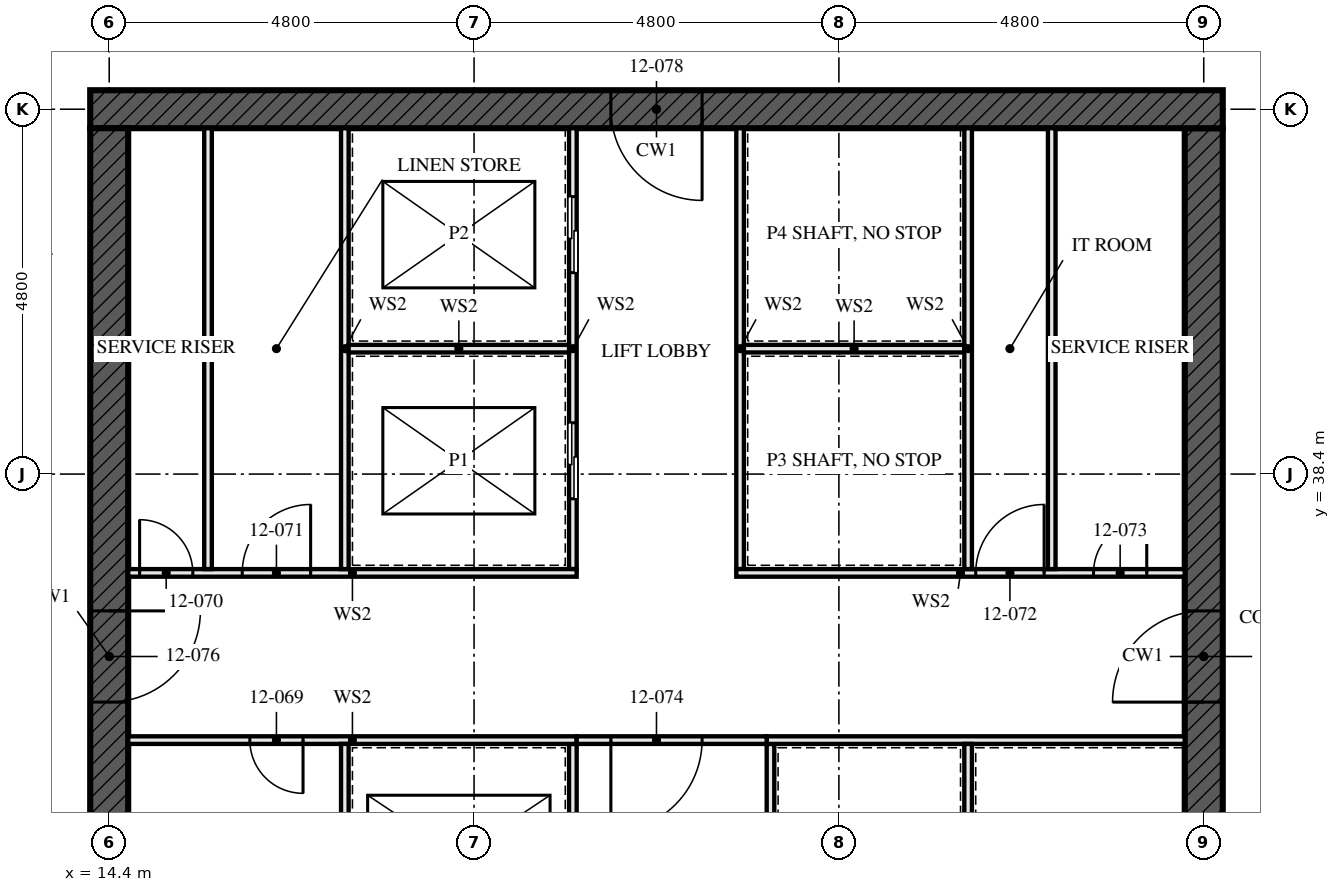
"""IFC4 building model, lengths in metres.
Left out: names, types, materials, properties, quantities, classifications, styles, units other than length and angle.
Written with IfcOpenShell. Run it as: python <this file> out.ifc"""

import sys

from ifc_helpers import new_model, si_unit, direction, frame, frame_2d, origin, place, context, subcontext, project, spatial, rectangle, extrude, element, fill, save


model = new_model("IFC4")
c1 = context("Model", 3, precision=1e-05, world=origin(), true_north=direction((0.0, 1.0)))
c2 = subcontext(c1, "Body", "Model", "MODEL_VIEW")
j1 = project(units=[si_unit("LENGTHUNIT", "METRE"), si_unit("PLANEANGLEUNIT", "RADIAN")], contexts=[c1])
p1 = place(None, origin())
s1 = spatial("IfcSite", under=j1, at=p1, CompositionType="ELEMENT")
p2 = place(p1, origin())
s2 = spatial("IfcBuilding", under=s1, at=p2, CompositionType="ELEMENT")
p3 = place(p2, frame((0.0, 0.0, 48.0)))
s3 = spatial("IfcBuildingStorey", under=s2, at=p3, CompositionType="ELEMENT", Elevation=48.0)
p4 = place(p3, frame((29.05, 43.2, -0.17), z_axis=(0.0, 0.0, 1.0), x_axis=(-1.0, 0.0, 0.0)))
e1 = element("IfcWall", 1, at=p4, inside=s3, PredefinedType="SHEAR", context=c2, shape_type="SweptSolid", body=[
    extrude(rectangle(XDim=14.9, YDim=0.5, at=frame_2d((7.45, 0.0))), origin(), (0.0, 0.0, 1.0), 3.5),
])
p5 = place(p4, frame((6.85, 0.0, 0.17)))
e2 = element("IfcOpeningElement", 2, at=p5, cuts=e1, PredefinedType="OPENING", context=c2, shape_type="SweptSolid", body=[
    extrude(rectangle(XDim=1.2, YDim=2.1, at=frame_2d((0.6, 1.05))), frame((0.0, 0.26, 0.0), z_axis=(0.0, -1.0, 0.0), x_axis=(1.0, 0.0, 0.0)), (0.0, 0.0, 1.0), 0.521),
])
p6 = place(p3, frame((14.4, 42.95, -0.17), z_axis=(0.0, 0.0, 1.0), x_axis=(0.0, -1.0, 0.0)))
e3 = element("IfcWall", 3, at=p6, inside=s3, PredefinedType="SHEAR", context=c2, shape_type="SweptSolid", body=[
    extrude(rectangle(XDim=13.9, YDim=0.5, at=frame_2d((6.95, 0.0))), origin(), (0.0, 0.0, 1.0), 3.5),
])
p7 = place(p6, frame((6.35, 0.0, 0.17)))
e4 = element("IfcOpeningElement", 4, at=p7, cuts=e3, PredefinedType="OPENING", context=c2, shape_type="SweptSolid", body=[
    extrude(rectangle(XDim=1.2, YDim=2.1, at=frame_2d((0.6, 1.05))), frame((0.0, 0.26, 0.0), z_axis=(0.0, -1.0, 0.0), x_axis=(1.0, 0.0, 0.0)), (0.0, 0.0, 1.0), 0.521),
])
p8 = place(p3, frame((28.8, 29.05, -0.17), z_axis=(0.0, 0.0, 1.0), x_axis=(0.0, 1.0, 0.0)))
e5 = element("IfcWall", 5, at=p8, inside=s3, PredefinedType="SHEAR", context=c2, shape_type="SweptSolid", body=[
    extrude(rectangle(XDim=13.9, YDim=0.5, at=frame_2d((6.95, 0.0))), origin(), (0.0, 0.0, 1.0), 3.5),
])
p9 = place(p8, frame((6.35, 0.0, 0.17)))
e6 = element("IfcOpeningElement", 6, at=p9, cuts=e5, PredefinedType="OPENING", context=c2, shape_type="SweptSolid", body=[
    extrude(rectangle(XDim=1.2, YDim=2.1, at=frame_2d((0.6, 1.05))), frame((0.0, 0.26, 0.0), z_axis=(0.0, -1.0, 0.0), x_axis=(1.0, 0.0, 0.0)), (0.0, 0.0, 1.0), 0.521),
])
for number, where, z_axis, x_axis in (
    (7, (15.7, 37.15, 0.0), (0.0, 0.0, 1.0), (0.0, 1.0, 0.0)),
    (8, (26.8, 37.15, 0.0), (0.0, 0.0, 1.0), (0.0, 1.0, 0.0)),
):
    element("IfcWall", number, at=place(p3, frame(where, z_axis=z_axis, x_axis=x_axis)), inside=s3, PredefinedType="SOLIDWALL", context=c2, shape_type="SweptSolid", body=[
        extrude(rectangle(XDim=5.8, YDim=0.1, at=frame_2d((2.9, 0.0))), origin(), (0.0, 0.0, 1.0), 3.33),
    ])
p10 = place(p3, frame((20.5, 29.05, 0.0), z_axis=(0.0, 0.0, 1.0), x_axis=(0.0, 1.0, 0.0)))
e9 = element("IfcWall", 9, at=p10, inside=s3, PredefinedType="SOLIDWALL", context=c2, shape_type="SweptSolid", body=[
    extrude(rectangle(XDim=5.8, YDim=0.1, at=frame_2d((2.9, 0.0))), origin(), (0.0, 0.0, 1.0), 3.33),
])
p11 = place(p10, frame((0.8, 0.0, 0.0)))
e10 = element("IfcOpeningElement", 10, at=p11, cuts=e9, PredefinedType="OPENING", context=c2, shape_type="SweptSolid", body=[
    extrude(rectangle(XDim=1.1, YDim=2.3, at=frame_2d((0.55, 1.15))), frame((0.0, 0.061, 0.0), z_axis=(0.0, -1.0, 0.0), x_axis=(1.0, 0.0, 0.0)), (0.0, 0.0, 1.0), 0.121),
])
p12 = place(p10, frame((3.775, 0.0, 0.0)))
e11 = element("IfcOpeningElement", 11, at=p12, cuts=e9, PredefinedType="OPENING", context=c2, shape_type="SweptSolid", body=[
    extrude(rectangle(XDim=1.1, YDim=2.3, at=frame_2d((0.55, 1.15))), frame((0.0, 0.061, 0.0), z_axis=(0.0, -1.0, 0.0), x_axis=(1.0, 0.0, 0.0)), (0.0, 0.0, 1.0), 0.121),
])
p13 = place(p3, frame((20.5, 37.15, 0.0), z_axis=(0.0, 0.0, 1.0), x_axis=(0.0, 1.0, 0.0)))
e12 = element("IfcWall", 12, at=p13, inside=s3, PredefinedType="SOLIDWALL", context=c2, shape_type="SweptSolid", body=[
    extrude(rectangle(XDim=5.8, YDim=0.1, at=frame_2d((2.9, 0.0))), origin(), (0.0, 0.0, 1.0), 3.33),
])
p14 = place(p13, frame((0.925, 0.0, 0.0)))
e13 = element("IfcOpeningElement", 13, at=p14, cuts=e12, PredefinedType="OPENING", context=c2, shape_type="SweptSolid", body=[
    extrude(rectangle(XDim=1.0, YDim=2.1, at=frame_2d((0.5, 1.05))), frame((0.0, 0.061, 0.0), z_axis=(0.0, -1.0, 0.0), x_axis=(1.0, 0.0, 0.0)), (0.0, 0.0, 1.0), 0.121),
])
p15 = place(p13, frame((3.9, 0.0, 0.0)))
e14 = element("IfcOpeningElement", 14, at=p15, cuts=e12, PredefinedType="OPENING", context=c2, shape_type="SweptSolid", body=[
    extrude(rectangle(XDim=1.0, YDim=2.1, at=frame_2d((0.5, 1.05))), frame((0.0, 0.061, 0.0), z_axis=(0.0, -1.0, 0.0), x_axis=(1.0, 0.0, 0.0)), (0.0, 0.0, 1.0), 0.121),
])
p16 = place(p3, frame((22.7, 37.15, 0.0), z_axis=(0.0, 0.0, 1.0), x_axis=(0.0, 1.0, 0.0)))
e15 = element("IfcWall", 15, at=p16, inside=s3, PredefinedType="SOLIDWALL", context=c2, shape_type="SweptSolid", body=[
    extrude(rectangle(XDim=5.8, YDim=0.1, at=frame_2d((2.9, 0.0))), origin(), (0.0, 0.0, 1.0), 3.33),
])
p17 = place(p3, frame((23.1, 29.05, 0.0), z_axis=(0.0, 0.0, 1.0), x_axis=(0.0, 1.0, 0.0)))
e16 = element("IfcWall", 16, at=p17, inside=s3, PredefinedType="SOLIDWALL", context=c2, shape_type="SweptSolid", body=[
    extrude(rectangle(XDim=5.8, YDim=0.1, at=frame_2d((2.9, 0.0))), origin(), (0.0, 0.0, 1.0), 3.33),
])
p18 = place(p17, frame((1.0, 0.0, 0.0)))
e17 = element("IfcOpeningElement", 17, at=p18, cuts=e16, PredefinedType="OPENING", context=c2, shape_type="SweptSolid", body=[
    extrude(rectangle(XDim=0.7, YDim=2.1, at=frame_2d((0.35, 1.05))), frame((0.0, 0.061, 0.0), z_axis=(0.0, -1.0, 0.0), x_axis=(1.0, 0.0, 0.0)), (0.0, 0.0, 1.0), 0.121),
])
p19 = place(p3, frame((14.65, 34.9, 0.0), z_axis=(0.0, 0.0, 1.0), x_axis=(1.0, 0.0, 0.0)))
e18 = element("IfcWall", 18, at=p19, inside=s3, PredefinedType="SOLIDWALL", context=c2, shape_type="SweptSolid", body=[
    extrude(rectangle(XDim=5.9, YDim=0.1, at=frame_2d((2.95, 0.0))), origin(), (0.0, 0.0, 1.0), 3.33),
])
p20 = place(p19, frame((1.6, 0.0, 0.0)))
e19 = element("IfcOpeningElement", 19, at=p20, cuts=e18, PredefinedType="OPENING", context=c2, shape_type="SweptSolid", body=[
    extrude(rectangle(XDim=0.7, YDim=2.1, at=frame_2d((0.35, 1.05))), frame((0.0, 0.061, 0.0), z_axis=(0.0, -1.0, 0.0), x_axis=(1.0, 0.0, 0.0)), (0.0, 0.0, 1.0), 0.121),
])
p21 = place(p3, frame((23.05, 34.9, 0.0), z_axis=(0.0, 0.0, 1.0), x_axis=(1.0, 0.0, 0.0)))
e20 = element("IfcWall", 20, at=p21, inside=s3, PredefinedType="SOLIDWALL", context=c2, shape_type="SweptSolid", body=[
    extrude(rectangle(XDim=5.5, YDim=0.1, at=frame_2d((2.75, 0.0))), origin(), (0.0, 0.0, 1.0), 3.33),
])
p22 = place(p3, frame((14.65, 37.1, 0.0), z_axis=(0.0, 0.0, 1.0), x_axis=(1.0, 0.0, 0.0)))
e21 = element("IfcWall", 21, at=p22, inside=s3, PredefinedType="SOLIDWALL", context=c2, shape_type="SweptSolid", body=[
    extrude(rectangle(XDim=5.9, YDim=0.1, at=frame_2d((2.95, 0.0))), origin(), (0.0, 0.0, 1.0), 3.33),
])
p23 = place(p22, frame((0.15, 0.0, 0.0)))
e22 = element("IfcOpeningElement", 22, at=p23, cuts=e21, PredefinedType="OPENING", context=c2, shape_type="SweptSolid", body=[
    extrude(rectangle(XDim=0.7, YDim=2.1, at=frame_2d((0.35, 1.05))), frame((0.0, 0.061, 0.0), z_axis=(0.0, -1.0, 0.0), x_axis=(1.0, 0.0, 0.0)), (0.0, 0.0, 1.0), 0.121),
])
p24 = place(p22, frame((1.5, 0.0, 0.0)))
e23 = element("IfcOpeningElement", 23, at=p24, cuts=e21, PredefinedType="OPENING", context=c2, shape_type="SweptSolid", body=[
    extrude(rectangle(XDim=0.9, YDim=2.1, at=frame_2d((0.45, 1.05))), frame((0.0, 0.061, 0.0), z_axis=(0.0, -1.0, 0.0), x_axis=(1.0, 0.0, 0.0)), (0.0, 0.0, 1.0), 0.121),
])
p25 = place(p3, frame((22.65, 37.1, 0.0), z_axis=(0.0, 0.0, 1.0), x_axis=(1.0, 0.0, 0.0)))
e24 = element("IfcWall", 24, at=p25, inside=s3, PredefinedType="SOLIDWALL", context=c2, shape_type="SweptSolid", body=[
    extrude(rectangle(XDim=5.9, YDim=0.1, at=frame_2d((2.95, 0.0))), origin(), (0.0, 0.0, 1.0), 3.33),
])
p26 = place(p25, frame((3.15, 0.0, 0.0)))
e25 = element("IfcOpeningElement", 25, at=p26, cuts=e24, PredefinedType="OPENING", context=c2, shape_type="SweptSolid", body=[
    extrude(rectangle(XDim=0.9, YDim=2.1, at=frame_2d((0.45, 1.05))), frame((0.0, 0.061, 0.0), z_axis=(0.0, -1.0, 0.0), x_axis=(1.0, 0.0, 0.0)), (0.0, 0.0, 1.0), 0.121),
])
p27 = place(p25, frame((4.7, 0.0, 0.0)))
e26 = element("IfcOpeningElement", 26, at=p27, cuts=e24, PredefinedType="OPENING", context=c2, shape_type="SweptSolid", body=[
    extrude(rectangle(XDim=0.7, YDim=2.1, at=frame_2d((0.35, 1.05))), frame((0.0, 0.061, 0.0), z_axis=(0.0, -1.0, 0.0), x_axis=(1.0, 0.0, 0.0)), (0.0, 0.0, 1.0), 0.121),
])
p28 = place(p3, frame((20.55, 34.9, 0.0), z_axis=(0.0, 0.0, 1.0), x_axis=(1.0, 0.0, 0.0)))
e27 = element("IfcWall", 27, at=p28, inside=s3, PredefinedType="SOLIDWALL", context=c2, shape_type="SweptSolid", body=[
    extrude(rectangle(XDim=2.5, YDim=0.1, at=frame_2d((1.25, 0.0))), origin(), (0.0, 0.0, 1.0), 3.33),
])
p29 = place(p28, frame((0.45, 0.0, 0.0)))
e28 = element("IfcOpeningElement", 28, at=p29, cuts=e27, PredefinedType="OPENING", context=c2, shape_type="SweptSolid", body=[
    extrude(rectangle(XDim=1.2, YDim=2.1, at=frame_2d((0.6, 1.05))), frame((0.0, 0.061, 0.0), z_axis=(0.0, -1.0, 0.0), x_axis=(1.0, 0.0, 0.0)), (0.0, 0.0, 1.0), 0.121),
])
for number, where, z_axis, x_axis in (
    (29, (17.5, 29.05, 0.0), (0.0, 0.0, 1.0), (0.0, 1.0, 0.0)),
    (30, (17.5, 37.15, 0.0), (0.0, 0.0, 1.0), (0.0, 1.0, 0.0)),
):
    element("IfcWall", number, at=place(p3, frame(where, z_axis=z_axis, x_axis=x_axis)), inside=s3, PredefinedType="SOLIDWALL", context=c2, shape_type="SweptSolid", body=[
        extrude(rectangle(XDim=5.8, YDim=0.1, at=frame_2d((2.9, 0.0))), origin(), (0.0, 0.0, 1.0), 3.33),
    ])
for number, where, z_axis, x_axis in (
    (31, (17.55, 40.05, 0.0), (0.0, 0.0, 1.0), (1.0, 0.0, 0.0)),
    (32, (22.75, 40.05, 0.0), (0.0, 0.0, 1.0), (1.0, 0.0, 0.0)),
):
    element("IfcWall", number, at=place(p3, frame(where, z_axis=z_axis, x_axis=x_axis)), inside=s3, PredefinedType="SOLIDWALL", context=c2, shape_type="SweptSolid", body=[
        extrude(rectangle(XDim=2.9, YDim=0.1, at=frame_2d((1.45, 0.0))), origin(), (0.0, 0.0, 1.0), 3.33),
    ])
p30 = place(p3, frame((25.7, 37.15, 0.0), z_axis=(0.0, 0.0, 1.0), x_axis=(0.0, 1.0, 0.0)))
e33 = element("IfcWall", 33, at=p30, inside=s3, PredefinedType="SOLIDWALL", context=c2, shape_type="SweptSolid", body=[
    extrude(rectangle(XDim=5.8, YDim=0.1, at=frame_2d((2.9, 0.0))), origin(), (0.0, 0.0, 1.0), 3.33),
])
p31 = place(p3, frame((25.7, 31.95, 0.0), z_axis=(0.0, 0.0, 1.0), x_axis=(0.0, 1.0, 0.0)))
e34 = element("IfcWall", 34, at=p31, inside=s3, PredefinedType="SOLIDWALL", context=c2, shape_type="SweptSolid", body=[
    extrude(rectangle(XDim=2.9, YDim=0.1, at=frame_2d((1.45, 0.0))), origin(), (0.0, 0.0, 1.0), 3.33),
])
p32 = place(p14, origin())
e35 = element("IfcDoor", 35, at=p32, inside=s3, OperationType="SLIDING_TO_LEFT", PredefinedType="DOOR", context=c2, shape_type="SweptSolid", body=[
    extrude(rectangle(XDim=1.0, YDim=2.1, at=frame_2d((0.5, 1.05))), frame((0.0, 0.05, 0.0), z_axis=(0.0, -1.0, 0.0), x_axis=(1.0, 0.0, 0.0)), (0.0, 0.0, 1.0), 0.1),
])
fill(e13, e35)
p33 = place(p15, origin())
e36 = element("IfcDoor", 36, at=p33, inside=s3, OperationType="SLIDING_TO_LEFT", PredefinedType="DOOR", context=c2, shape_type="SweptSolid", body=[
    extrude(rectangle(XDim=1.0, YDim=2.1, at=frame_2d((0.5, 1.05))), frame((0.0, 0.05, 0.0), z_axis=(0.0, -1.0, 0.0), x_axis=(1.0, 0.0, 0.0)), (0.0, 0.0, 1.0), 0.1),
])
fill(e14, e36)
p34 = place(p20, frame((0.7, 0.0, 0.0), z_axis=(0.0, 0.0, 1.0), x_axis=(-1.0, 0.0, 0.0)))
e37 = element("IfcDoor", 37, at=p34, inside=s3, OperationType="SINGLE_SWING_RIGHT", PredefinedType="DOOR", context=c2, shape_type="SweptSolid", body=[
    extrude(rectangle(XDim=0.7, YDim=2.1, at=frame_2d((0.35, 1.05))), frame((0.0, 0.027, 0.0), z_axis=(0.0, -1.0, 0.0), x_axis=(1.0, 0.0, 0.0)), (0.0, 0.0, 1.0), 0.054),
])
fill(e19, e37)
p35 = place(p23, origin())
e38 = element("IfcDoor", 38, at=p35, inside=s3, OperationType="SINGLE_SWING_RIGHT", PredefinedType="DOOR", context=c2, shape_type="SweptSolid", body=[
    extrude(rectangle(XDim=0.7, YDim=2.1, at=frame_2d((0.35, 1.05))), frame((0.0, 0.027, 0.0), z_axis=(0.0, -1.0, 0.0), x_axis=(1.0, 0.0, 0.0)), (0.0, 0.0, 1.0), 0.054),
])
fill(e22, e38)
p36 = place(p24, origin())
e39 = element("IfcDoor", 39, at=p36, inside=s3, OperationType="SINGLE_SWING_LEFT", PredefinedType="DOOR", context=c2, shape_type="SweptSolid", body=[
    extrude(rectangle(XDim=0.9, YDim=2.1, at=frame_2d((0.45, 1.05))), frame((0.0, 0.027, 0.0), z_axis=(0.0, -1.0, 0.0), x_axis=(1.0, 0.0, 0.0)), (0.0, 0.0, 1.0), 0.054),
])
fill(e23, e39)
p37 = place(p26, origin())
e40 = element("IfcDoor", 40, at=p37, inside=s3, OperationType="SINGLE_SWING_LEFT", PredefinedType="DOOR", context=c2, shape_type="SweptSolid", body=[
    extrude(rectangle(XDim=0.9, YDim=2.1, at=frame_2d((0.45, 1.05))), frame((0.0, 0.027, 0.0), z_axis=(0.0, -1.0, 0.0), x_axis=(1.0, 0.0, 0.0)), (0.0, 0.0, 1.0), 0.054),
])
fill(e25, e40)
p38 = place(p27, origin())
e41 = element("IfcDoor", 41, at=p38, inside=s3, OperationType="SINGLE_SWING_LEFT", PredefinedType="DOOR", context=c2, shape_type="SweptSolid", body=[
    extrude(rectangle(XDim=0.7, YDim=2.1, at=frame_2d((0.35, 1.05))), frame((0.0, 0.027, 0.0), z_axis=(0.0, -1.0, 0.0), x_axis=(1.0, 0.0, 0.0)), (0.0, 0.0, 1.0), 0.054),
])
fill(e26, e41)
p39 = place(p29, frame((1.2, 0.0, 0.0), z_axis=(0.0, 0.0, 1.0), x_axis=(-1.0, 0.0, 0.0)))
e42 = element("IfcDoor", 42, at=p39, inside=s3, OperationType="SINGLE_SWING_LEFT", PredefinedType="DOOR", context=c2, shape_type="SweptSolid", body=[
    extrude(rectangle(XDim=1.2, YDim=2.1, at=frame_2d((0.6, 1.05))), frame((0.0, 0.027, 0.0), z_axis=(0.0, -1.0, 0.0), x_axis=(1.0, 0.0, 0.0)), (0.0, 0.0, 1.0), 0.054),
])
fill(e28, e42)
p40 = place(p7, origin())
e43 = element("IfcDoor", 43, at=p40, inside=s3, OperationType="SINGLE_SWING_LEFT", PredefinedType="DOOR", context=c2, shape_type="SweptSolid", body=[
    extrude(rectangle(XDim=1.2, YDim=2.1, at=frame_2d((0.6, 1.05))), frame((0.0, 0.027, 0.0), z_axis=(0.0, -1.0, 0.0), x_axis=(1.0, 0.0, 0.0)), (0.0, 0.0, 1.0), 0.054),
])
fill(e4, e43)
p41 = place(p9, origin())
e44 = element("IfcDoor", 44, at=p41, inside=s3, OperationType="SINGLE_SWING_LEFT", PredefinedType="DOOR", context=c2, shape_type="SweptSolid", body=[
    extrude(rectangle(XDim=1.2, YDim=2.1, at=frame_2d((0.6, 1.05))), frame((0.0, 0.027, 0.0), z_axis=(0.0, -1.0, 0.0), x_axis=(1.0, 0.0, 0.0)), (0.0, 0.0, 1.0), 0.054),
])
fill(e6, e44)
p42 = place(p5, origin())
e45 = element("IfcDoor", 45, at=p42, inside=s3, OperationType="SINGLE_SWING_LEFT", PredefinedType="DOOR", context=c2, shape_type="SweptSolid", body=[
    extrude(rectangle(XDim=1.2, YDim=2.1, at=frame_2d((0.6, 1.05))), frame((0.0, 0.027, 0.0), z_axis=(0.0, -1.0, 0.0), x_axis=(1.0, 0.0, 0.0)), (0.0, 0.0, 1.0), 0.054),
])
fill(e2, e45)
save(model, sys.argv[1])
